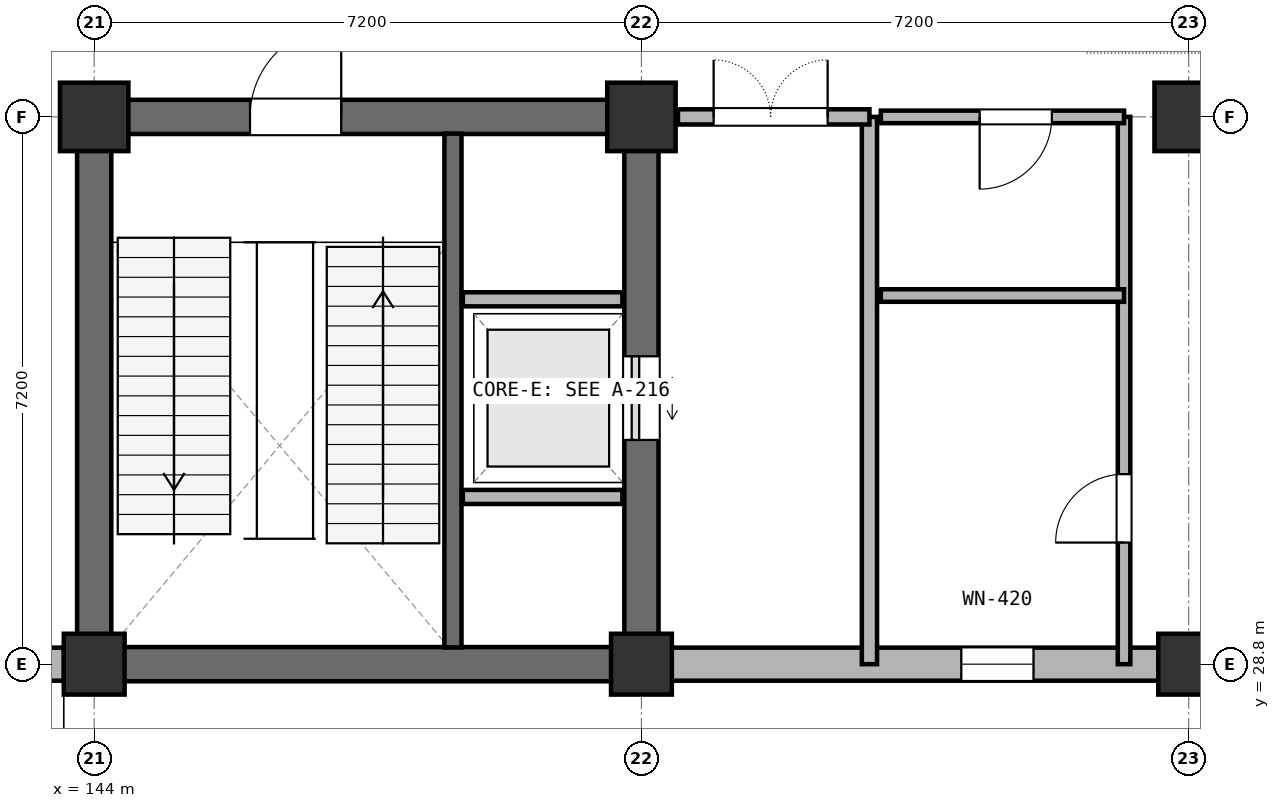
"""IFC4 building model, lengths in metres.
Left out: names, types, materials, properties, quantities, classifications, styles, units other than length and angle.
Written with IfcOpenShell. Run it as: python <this file> out.ifc"""

import sys

from ifc_helpers import new_model, si_unit, direction, frame, frame_2d, origin, origin_2d, place, context, subcontext, project, spatial, rectangle, extrude, element, fill, save


model = new_model("IFC4")
c1 = context("Model", 3, precision=1e-05, world=origin(), true_north=direction((0.0, 1.0)))
c2 = subcontext(c1, "Body", "Model", "MODEL_VIEW")
j1 = project(units=[si_unit("LENGTHUNIT", "METRE"), si_unit("PLANEANGLEUNIT", "RADIAN")], contexts=[c1])
p1 = place(None, origin())
s1 = spatial("IfcSite", under=j1, at=p1, CompositionType="ELEMENT")
p2 = place(p1, origin())
s2 = spatial("IfcBuilding", under=s1, at=p2, CompositionType="ELEMENT")
p3 = place(p2, origin())
s3 = spatial("IfcBuildingStorey", under=s2, at=p3, CompositionType="ELEMENT", Elevation=0.0)
p4 = place(p3, frame((144.0, 28.8, 0.0), z_axis=(0.0, 0.0, 1.0), x_axis=(1.0, 0.0, 0.0)))
e1 = element("IfcColumn", 1, at=p4, inside=s3, PredefinedType="COLUMN", context=c2, shape_type="SweptSolid", body=[
    extrude(rectangle(XDim=0.8, YDim=0.8, at=origin_2d()), origin(), (0.0, 0.0, 1.0), 5.4),
])
p5 = place(p3, frame((144.0, 36.0, 0.0), z_axis=(0.0, 0.0, 1.0), x_axis=(1.0, 0.0, 0.0)))
e2 = element("IfcColumn", 2, at=p5, inside=s3, PredefinedType="COLUMN", context=c2, shape_type="SweptSolid", body=[
    extrude(rectangle(XDim=0.9, YDim=0.9, at=origin_2d()), origin(), (0.0, 0.0, 1.0), 5.4),
])
p6 = place(p3, frame((151.2, 28.8, 0.0), z_axis=(0.0, 0.0, 1.0), x_axis=(1.0, 0.0, 0.0)))
e3 = element("IfcColumn", 3, at=p6, inside=s3, PredefinedType="COLUMN", context=c2, shape_type="SweptSolid", body=[
    extrude(rectangle(XDim=0.8, YDim=0.8, at=origin_2d()), origin(), (0.0, 0.0, 1.0), 5.4),
])
p7 = place(p3, frame((151.2, 36.0, 0.0), z_axis=(0.0, 0.0, 1.0), x_axis=(1.0, 0.0, 0.0)))
e4 = element("IfcColumn", 4, at=p7, inside=s3, PredefinedType="COLUMN", context=c2, shape_type="SweptSolid", body=[
    extrude(rectangle(XDim=0.9, YDim=0.9, at=origin_2d()), origin(), (0.0, 0.0, 1.0), 5.4),
])
p8 = place(p3, frame((158.4, 28.8, 0.0), z_axis=(0.0, 0.0, 1.0), x_axis=(1.0, 0.0, 0.0)))
e5 = element("IfcColumn", 5, at=p8, inside=s3, PredefinedType="COLUMN", context=c2, shape_type="SweptSolid", body=[
    extrude(rectangle(XDim=0.8, YDim=0.8, at=origin_2d()), origin(), (0.0, 0.0, 1.0), 5.4),
])
p9 = place(p3, frame((158.4, 36.0, 0.0), z_axis=(0.0, 0.0, 1.0), x_axis=(1.0, 0.0, 0.0)))
e6 = element("IfcColumn", 6, at=p9, inside=s3, PredefinedType="COLUMN", context=c2, shape_type="SweptSolid", body=[
    extrude(rectangle(XDim=0.9, YDim=0.9, at=origin_2d()), origin(), (0.0, 0.0, 1.0), 5.4),
])
p10 = place(p3, frame((144.35, 28.8, 0.0), z_axis=(0.0, 0.0, 1.0), x_axis=(1.0, 0.0, 0.0)))
e7 = element("IfcWall", 7, at=p10, inside=s3, PredefinedType="SHEAR", context=c2, shape_type="SweptSolid", body=[
    extrude(rectangle(XDim=6.5, YDim=0.45, at=frame_2d((3.25, 0.0))), origin(), (0.0, 0.0, 1.0), 5.4),
])
p11 = place(p3, frame((151.2, 29.15, 0.0), z_axis=(0.0, 0.0, 1.0), x_axis=(0.0, 1.0, 0.0)))
e8 = element("IfcWall", 8, at=p11, inside=s3, PredefinedType="SHEAR", context=c2, shape_type="SweptSolid", body=[
    extrude(rectangle(XDim=6.5, YDim=0.45, at=frame_2d((3.25, 0.0))), origin(), (0.0, 0.0, 1.0), 5.4),
])
p12 = place(p11, frame((2.6, 0.0, 0.0)))
e9 = element("IfcOpeningElement", 9, at=p12, cuts=e8, PredefinedType="OPENING", context=c2, shape_type="SweptSolid", body=[
    extrude(rectangle(XDim=1.1, YDim=2.2, at=frame_2d((0.55, 1.1))), frame((0.0, 0.235, 0.0), z_axis=(0.0, -1.0, 0.0), x_axis=(1.0, 0.0, 0.0)), (0.0, 0.0, 1.0), 0.47),
])
p13 = place(p3, frame((150.85, 36.0, 0.0), z_axis=(0.0, 0.0, 1.0), x_axis=(-1.0, 0.0, 0.0)))
e10 = element("IfcWall", 10, at=p13, inside=s3, PredefinedType="SHEAR", context=c2, shape_type="SweptSolid", body=[
    extrude(rectangle(XDim=6.5, YDim=0.45, at=frame_2d((3.25, 0.0))), origin(), (0.0, 0.0, 1.0), 5.4),
])
p14 = place(p13, frame((3.6, 0.0, 0.0)))
e11 = element("IfcOpeningElement", 11, at=p14, cuts=e10, PredefinedType="OPENING", context=c2, shape_type="SweptSolid", body=[
    extrude(rectangle(XDim=1.2, YDim=2.2, at=frame_2d((0.6, 1.1))), frame((0.0, 0.235, 0.0), z_axis=(0.0, -1.0, 0.0), x_axis=(1.0, 0.0, 0.0)), (0.0, 0.0, 1.0), 0.47),
])
p15 = place(p3, frame((144.0, 35.65, 0.0), z_axis=(0.0, 0.0, 1.0), x_axis=(0.0, -1.0, 0.0)))
e12 = element("IfcWall", 12, at=p15, inside=s3, PredefinedType="SHEAR", context=c2, shape_type="SweptSolid", body=[
    extrude(rectangle(XDim=6.5, YDim=0.45, at=frame_2d((3.25, 0.0))), origin(), (0.0, 0.0, 1.0), 5.4),
])
p16 = place(p3, frame((148.72, 29.02, 0.0), z_axis=(0.0, 0.0, 1.0), x_axis=(0.0, 1.0, 0.0)))
e13 = element("IfcWall", 13, at=p16, inside=s3, PredefinedType="SHEAR", context=c2, shape_type="SweptSolid", body=[
    extrude(rectangle(XDim=6.76, YDim=0.225, at=frame_2d((3.38, 0.0))), origin(), (0.0, 0.0, 1.0), 5.4),
])
for number, where, z_axis, x_axis in (
    (14, (148.85, 31.0, 0.0), (0.0, 0.0, 1.0), (1.0, 0.0, 0.0)),
    (15, (148.85, 33.6, 0.0), (0.0, 0.0, 1.0), (1.0, 0.0, 0.0)),
):
    element("IfcWall", number, at=place(p3, frame(where, z_axis=z_axis, x_axis=x_axis)), inside=s3, PredefinedType="PARTITIONING", context=c2, shape_type="SweptSolid", body=[
        extrude(rectangle(XDim=2.1, YDim=0.185, at=frame_2d((1.05, 0.0))), origin(), (0.0, 0.0, 1.0), 5.4),
    ])
p17 = place(p3, frame((137.198, 28.8, 0.0), z_axis=(0.0, 0.0, 1.0), x_axis=(1.0, 0.0, 0.0)))
e16 = element("IfcWall", 16, at=p17, inside=s3, PredefinedType="SOLIDWALL", context=c2, shape_type="SweptSolid", body=[
    extrude(rectangle(XDim=6.404, YDim=0.435, at=frame_2d((3.202, 0.0))), origin(), (0.0, 0.0, 1.0), 4.1),
])
p18 = place(p17, frame((2.702, 0.0, 0.7)))
e17 = element("IfcOpeningElement", 17, at=p18, cuts=e16, PredefinedType="OPENING", context=c2, shape_type="SweptSolid", body=[
    extrude(rectangle(XDim=0.95, YDim=2.15, at=frame_2d((0.475, 1.075))), frame((0.0, 0.228, 0.0), z_axis=(0.0, -1.0, 0.0), x_axis=(1.0, 0.0, 0.0)), (0.0, 0.0, 1.0), 0.455),
])
p19 = place(p3, frame((151.598, 28.8, 0.0), z_axis=(0.0, 0.0, 1.0), x_axis=(1.0, 0.0, 0.0)))
e18 = element("IfcWall", 18, at=p19, inside=s3, PredefinedType="SOLIDWALL", context=c2, shape_type="SweptSolid", body=[
    extrude(rectangle(XDim=6.404, YDim=0.435, at=frame_2d((3.202, 0.0))), origin(), (0.0, 0.0, 1.0), 4.1),
])
p20 = place(p19, frame((3.811, 0.0, 0.7)))
e19 = element("IfcOpeningElement", 19, at=p20, cuts=e18, PredefinedType="OPENING", context=c2, shape_type="SweptSolid", body=[
    extrude(rectangle(XDim=0.95, YDim=2.15, at=frame_2d((0.475, 1.075))), frame((0.0, 0.228, 0.0), z_axis=(0.0, -1.0, 0.0), x_axis=(1.0, 0.0, 0.0)), (0.0, 0.0, 1.0), 0.455),
])
p21 = place(p3, frame((154.2, 28.8, 0.0), z_axis=(0.0, 0.0, 1.0), x_axis=(0.0, 1.0, 0.0)))
e20 = element("IfcWall", 20, at=p21, inside=s3, PredefinedType="PARTITIONING", context=c2, shape_type="SweptSolid", body=[
    extrude(rectangle(XDim=7.2, YDim=0.2, at=frame_2d((3.6, 0.0))), origin(), (0.0, 0.0, 1.0), 4.12),
])
p22 = place(p3, frame((154.2, 36.0, 0.0), z_axis=(0.0, 0.0, 1.0), x_axis=(-1.0, 0.0, 0.0)))
e21 = element("IfcWall", 21, at=p22, inside=s3, PredefinedType="PARTITIONING", context=c2, shape_type="SweptSolid", body=[
    extrude(rectangle(XDim=2.52, YDim=0.2, at=frame_2d((1.26, 0.0))), origin(), (0.0, 0.0, 1.0), 4.12),
])
p23 = place(p22, frame((0.55, 0.0, 0.0)))
e22 = element("IfcOpeningElement", 22, at=p23, cuts=e21, PredefinedType="OPENING", context=c2, shape_type="SweptSolid", body=[
    extrude(rectangle(XDim=1.5, YDim=2.2, at=frame_2d((0.75, 1.1))), frame((0.0, 0.11, 0.0), z_axis=(0.0, -1.0, 0.0), x_axis=(1.0, 0.0, 0.0)), (0.0, 0.0, 1.0), 0.22),
])
p24 = place(p3, frame((157.55, 28.8, 0.0), z_axis=(0.0, 0.0, 1.0), x_axis=(0.0, 1.0, 0.0)))
e23 = element("IfcWall", 23, at=p24, inside=s3, PredefinedType="PARTITIONING", context=c2, shape_type="SweptSolid", body=[
    extrude(rectangle(XDim=7.2, YDim=0.165, at=frame_2d((3.6, 0.0))), origin(), (0.0, 0.0, 1.0), 4.12),
])
p25 = place(p24, frame((1.6, 0.0, 0.0)))
e24 = element("IfcOpeningElement", 24, at=p25, cuts=e23, PredefinedType="OPENING", context=c2, shape_type="SweptSolid", body=[
    extrude(rectangle(XDim=0.9, YDim=2.15, at=frame_2d((0.45, 1.075))), frame((0.0, 0.093, 0.0), z_axis=(0.0, -1.0, 0.0), x_axis=(1.0, 0.0, 0.0)), (0.0, 0.0, 1.0), 0.185),
])
p26 = place(p3, frame((157.55, 36.0, 0.0), z_axis=(0.0, 0.0, 1.0), x_axis=(-1.0, 0.0, 0.0)))
e25 = element("IfcWall", 25, at=p26, inside=s3, PredefinedType="PARTITIONING", context=c2, shape_type="SweptSolid", body=[
    extrude(rectangle(XDim=3.2, YDim=0.165, at=frame_2d((1.6, 0.0))), origin(), (0.0, 0.0, 1.0), 4.12),
])
p27 = place(p26, frame((0.95, 0.0, 0.0)))
e26 = element("IfcOpeningElement", 26, at=p27, cuts=e25, PredefinedType="OPENING", context=c2, shape_type="SweptSolid", body=[
    extrude(rectangle(XDim=0.95, YDim=2.15, at=frame_2d((0.475, 1.075))), frame((0.0, 0.093, 0.0), z_axis=(0.0, -1.0, 0.0), x_axis=(1.0, 0.0, 0.0)), (0.0, 0.0, 1.0), 0.185),
])
p28 = place(p3, frame((154.35, 33.65, 0.0), z_axis=(0.0, 0.0, 1.0), x_axis=(1.0, 0.0, 0.0)))
e27 = element("IfcWall", 27, at=p28, inside=s3, PredefinedType="PARTITIONING", context=c2, shape_type="SweptSolid", body=[
    extrude(rectangle(XDim=3.2, YDim=0.165, at=frame_2d((1.6, 0.0))), origin(), (0.0, 0.0, 1.0), 4.12),
])
p29 = place(p12, origin())
e28 = element("IfcDoor", 28, at=p29, inside=s3, OperationType="SLIDING_TO_LEFT", PredefinedType="DOOR", context=c2, shape_type="SweptSolid", body=[
    extrude(rectangle(XDim=1.1, YDim=2.2, at=frame_2d((0.55, 1.1))), frame((0.0, 0.025, 0.0), z_axis=(0.0, -1.0, 0.0), x_axis=(1.0, 0.0, 0.0)), (0.0, 0.0, 1.0), 0.05),
])
fill(e9, e28)
p30 = place(p20, origin())
e29 = element("IfcWindow", 29, at=p30, inside=s3, PartitioningType="SINGLE_PANEL", PredefinedType="WINDOW", context=c2, shape_type="SweptSolid", body=[
    extrude(rectangle(XDim=0.95, YDim=2.15, at=frame_2d((0.475, 1.075))), frame((0.0, 0.03, 0.0), z_axis=(0.0, -1.0, 0.0), x_axis=(1.0, 0.0, 0.0)), (0.0, 0.0, 1.0), 0.06),
])
fill(e19, e29)
p31 = place(p14, frame((1.2, 0.0, 0.0), z_axis=(0.0, 0.0, 1.0), x_axis=(-1.0, 0.0, 0.0)))
e30 = element("IfcDoor", 30, at=p31, inside=s3, OperationType="SINGLE_SWING_RIGHT", PredefinedType="DOOR", context=c2, shape_type="SweptSolid", body=[
    extrude(rectangle(XDim=1.2, YDim=2.2, at=frame_2d((0.6, 1.1))), frame((0.0, 0.025, 0.0), z_axis=(0.0, -1.0, 0.0), x_axis=(1.0, 0.0, 0.0)), (0.0, 0.0, 1.0), 0.05),
])
fill(e11, e30)
p32 = place(p23, frame((1.5, 0.0, 0.0), z_axis=(0.0, 0.0, 1.0), x_axis=(-1.0, 0.0, 0.0)))
e31 = element("IfcDoor", 31, at=p32, inside=s3, OperationType="DOUBLE_DOOR_SINGLE_SWING", PredefinedType="DOOR", context=c2, shape_type="SweptSolid", body=[
    extrude(rectangle(XDim=1.5, YDim=2.2, at=frame_2d((0.75, 1.1))), frame((0.0, 0.025, 0.0), z_axis=(0.0, -1.0, 0.0), x_axis=(1.0, 0.0, 0.0)), (0.0, 0.0, 1.0), 0.05),
])
fill(e22, e31)
p33 = place(p25, origin())
e32 = element("IfcDoor", 32, at=p33, inside=s3, OperationType="SINGLE_SWING_LEFT", PredefinedType="DOOR", context=c2, shape_type="SweptSolid", body=[
    extrude(rectangle(XDim=0.9, YDim=2.15, at=frame_2d((0.45, 1.075))), frame((0.0, 0.025, 0.0), z_axis=(0.0, -1.0, 0.0), x_axis=(1.0, 0.0, 0.0)), (0.0, 0.0, 1.0), 0.05),
])
fill(e24, e32)
p34 = place(p27, origin())
e33 = element("IfcDoor", 33, at=p34, inside=s3, OperationType="SINGLE_SWING_RIGHT", PredefinedType="DOOR", context=c2, shape_type="SweptSolid", body=[
    extrude(rectangle(XDim=0.95, YDim=2.15, at=frame_2d((0.475, 1.075))), frame((0.0, 0.025, 0.0), z_axis=(0.0, -1.0, 0.0), x_axis=(1.0, 0.0, 0.0)), (0.0, 0.0, 1.0), 0.05),
])
fill(e26, e33)
save(model, sys.argv[1])
